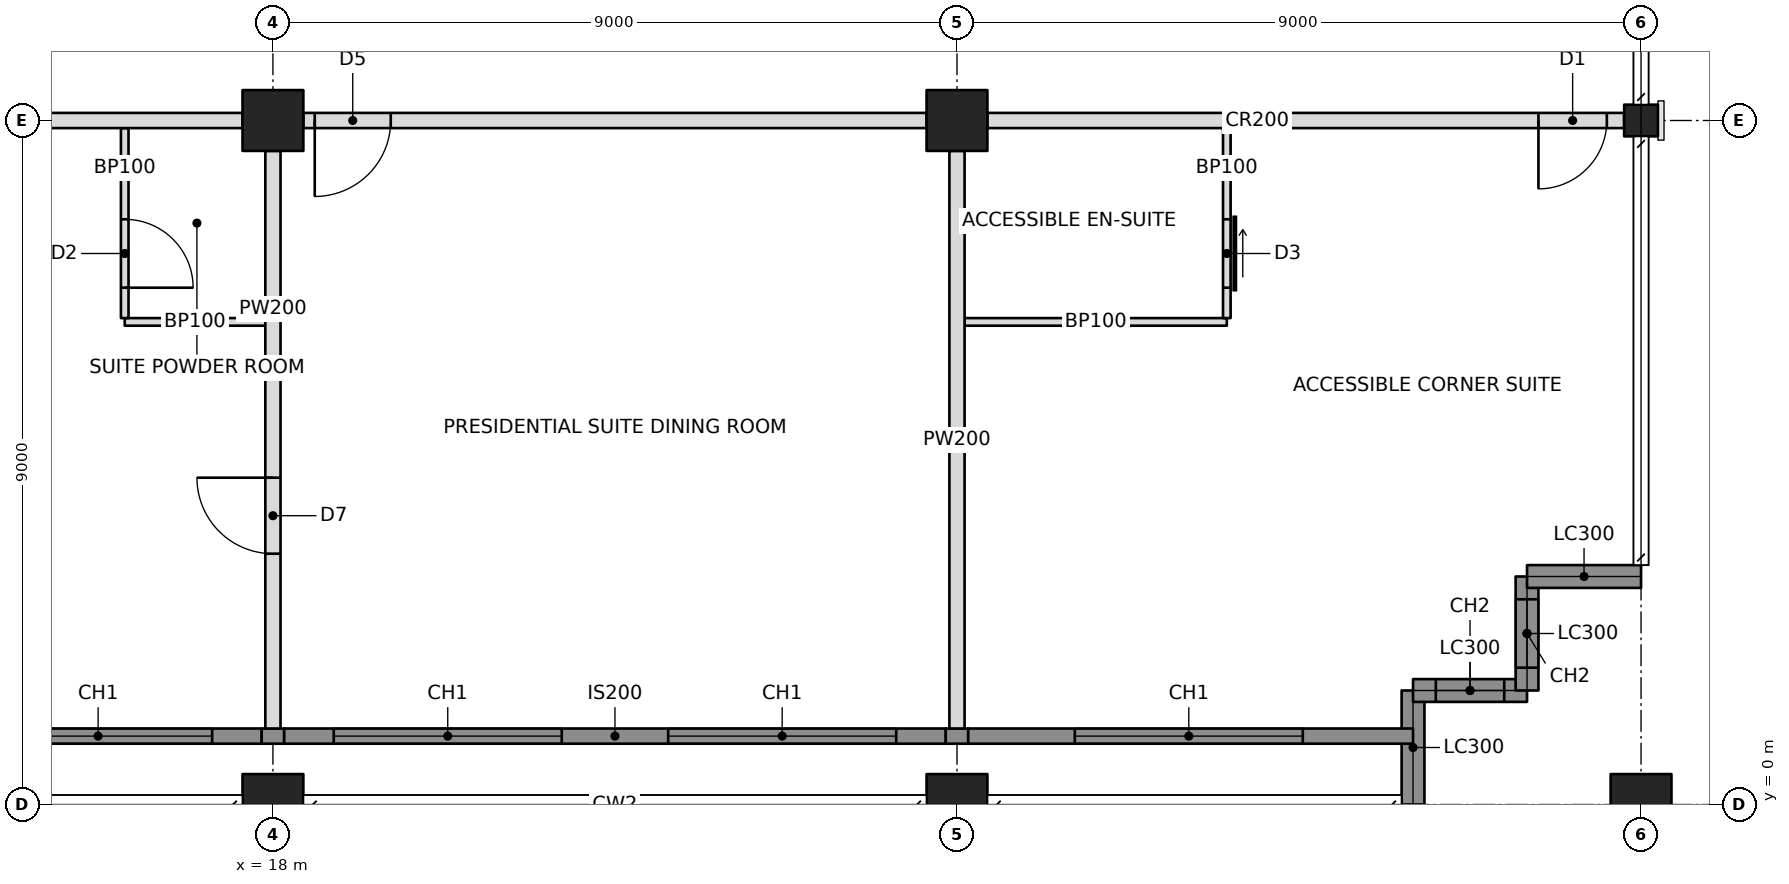
"""IFC4 building model, lengths in metres.
Left out: names, types, materials, properties, quantities, classifications, styles, units other than length and angle.
Written with IfcOpenShell. Run it as: python <this file> out.ifc"""

import sys

from ifc_helpers import new_model, si_unit, direction, frame, frame_2d, origin, origin_2d, place, context, subcontext, project, spatial, rectangle, hollow_rectangle, i_section, extrude, element, fill, save


model = new_model("IFC4")
c1 = context("Model", 3, precision=1e-05, world=origin(), true_north=direction((0.0, 1.0)))
c2 = subcontext(c1, "Body", "Model", "MODEL_VIEW")
j1 = project(units=[si_unit("LENGTHUNIT", "METRE"), si_unit("PLANEANGLEUNIT", "RADIAN")], contexts=[c1])
p1 = place(None, origin())
s1 = spatial("IfcSite", under=j1, at=p1, CompositionType="ELEMENT")
p2 = place(p1, origin())
s2 = spatial("IfcBuilding", under=s1, at=p2, CompositionType="ELEMENT")
p3 = place(p2, frame((0.0, 0.0, 266.2)))
s3 = spatial("IfcBuildingStorey", under=s2, at=p3, CompositionType="ELEMENT", Elevation=266.2)
for number, where, z_axis, x_axis in (
    (1, (18.0, 0.0, 0.0), (0.0, 0.0, 1.0), (1.0, 0.0, 0.0)),
    (2, (18.0, 9.0, 0.0), (0.0, 0.0, 1.0), (1.0, 0.0, 0.0)),
    (3, (27.0, 0.0, 0.0), (0.0, 0.0, 1.0), (1.0, 0.0, 0.0)),
    (4, (27.0, 9.0, 0.0), (0.0, 0.0, 1.0), (1.0, 0.0, 0.0)),
    (5, (36.0, 0.0, 0.0), (0.0, 0.0, 1.0), (1.0, 0.0, 0.0)),
):
    element("IfcColumn", number, at=place(p3, frame(where, z_axis=z_axis, x_axis=x_axis)), inside=s3, PredefinedType="COLUMN", context=c2, shape_type="SweptSolid", body=[
        extrude(hollow_rectangle(XDim=0.8, YDim=0.8, WallThickness=0.032, at=origin_2d()), origin(), (0.0, 0.0, 1.0), 3.6),
    ])
p4 = place(p3, frame((36.0, 9.0, 0.0), z_axis=(0.0, 0.0, 1.0), x_axis=(0.0, 1.0, 0.0)))
e6 = element("IfcColumn", 6, at=p4, inside=s3, PredefinedType="COLUMN", context=c2, shape_type="SweptSolid", body=[
    extrude(i_section(OverallWidth=0.417, OverallDepth=0.445, WebThickness=0.039, FlangeThickness=0.063, at=origin_2d()), origin(), (0.0, 0.0, 1.0), 3.6),
])
p5 = place(p3, frame((33.0, 0.0, 0.0), z_axis=(0.0, 0.0, 1.0), x_axis=(0.0, 1.0, 0.0)))
e7 = element("IfcWall", 7, at=p5, inside=s3, PredefinedType="SOLIDWALL", context=c2, shape_type="SweptSolid", body=[
    extrude(rectangle(XDim=1.5, YDim=0.3, at=frame_2d((0.75, 0.0))), origin(), (0.0, 0.0, 1.0), 2.57),
])
p6 = place(p3, frame((33.0, 1.5, 0.0), z_axis=(0.0, 0.0, 1.0), x_axis=(1.0, 0.0, 0.0)))
e8 = element("IfcWall", 8, at=p6, inside=s3, PredefinedType="SOLIDWALL", context=c2, shape_type="SweptSolid", body=[
    extrude(rectangle(XDim=1.5, YDim=0.3, at=frame_2d((0.75, 0.0))), origin(), (0.0, 0.0, 1.0), 3.35),
])
p7 = place(p6, frame((0.3, 0.0, 0.6)))
e9 = element("IfcOpeningElement", 9, at=p7, cuts=e8, PredefinedType="OPENING", context=c2, shape_type="SweptSolid", body=[
    extrude(rectangle(XDim=0.9, YDim=2.2, at=frame_2d((0.45, 1.1))), frame((0.0, 0.16, 0.0), z_axis=(0.0, -1.0, 0.0), x_axis=(1.0, 0.0, 0.0)), (0.0, 0.0, 1.0), 0.32),
])
p8 = place(p3, frame((34.5, 1.5, 0.0), z_axis=(0.0, 0.0, 1.0), x_axis=(0.0, 1.0, 0.0)))
e10 = element("IfcWall", 10, at=p8, inside=s3, PredefinedType="SOLIDWALL", context=c2, shape_type="SweptSolid", body=[
    extrude(rectangle(XDim=1.5, YDim=0.3, at=frame_2d((0.75, 0.0))), origin(), (0.0, 0.0, 1.0), 3.35),
])
p9 = place(p8, frame((0.3, 0.0, 0.6)))
e11 = element("IfcOpeningElement", 11, at=p9, cuts=e10, PredefinedType="OPENING", context=c2, shape_type="SweptSolid", body=[
    extrude(rectangle(XDim=0.9, YDim=2.2, at=frame_2d((0.45, 1.1))), frame((0.0, 0.16, 0.0), z_axis=(0.0, -1.0, 0.0), x_axis=(1.0, 0.0, 0.0)), (0.0, 0.0, 1.0), 0.32),
])
p10 = place(p3, frame((34.5, 3.0, 0.0), z_axis=(0.0, 0.0, 1.0), x_axis=(1.0, 0.0, 0.0)))
e12 = element("IfcWall", 12, at=p10, inside=s3, PredefinedType="SOLIDWALL", context=c2, shape_type="SweptSolid", body=[
    extrude(rectangle(XDim=1.5, YDim=0.3, at=frame_2d((0.75, 0.0))), origin(), (0.0, 0.0, 1.0), 2.57),
])
p11 = place(p3, frame((9.4, 9.0, 0.0), z_axis=(0.0, 0.0, 1.0), x_axis=(1.0, 0.0, 0.0)))
e13 = element("IfcWall", 13, at=p11, inside=s3, PredefinedType="PARTITIONING", context=c2, shape_type="SweptSolid", body=[
    extrude(rectangle(XDim=8.2, YDim=0.2, at=frame_2d((4.1, 0.0))), origin(), (0.0, 0.0, 1.0), 2.491),
])
p12 = place(p11, frame((0.15, 0.0, 0.0)))
e14 = element("IfcOpeningElement", 14, at=p12, cuts=e13, PredefinedType="OPENING", context=c2, shape_type="SweptSolid", body=[
    extrude(rectangle(XDim=0.9, YDim=2.1, at=frame_2d((0.45, 1.05))), frame((0.0, 0.11, 0.0), z_axis=(0.0, -1.0, 0.0), x_axis=(1.0, 0.0, 0.0)), (0.0, 0.0, 1.0), 0.22),
])
p13 = place(p3, frame((18.4, 9.0, 0.0), z_axis=(0.0, 0.0, 1.0), x_axis=(1.0, 0.0, 0.0)))
e15 = element("IfcWall", 15, at=p13, inside=s3, PredefinedType="PARTITIONING", context=c2, shape_type="SweptSolid", body=[
    extrude(rectangle(XDim=8.2, YDim=0.2, at=frame_2d((4.1, 0.0))), origin(), (0.0, 0.0, 1.0), 2.491),
])
p14 = place(p13, frame((0.15, 0.0, 0.0)))
e16 = element("IfcOpeningElement", 16, at=p14, cuts=e15, PredefinedType="OPENING", context=c2, shape_type="SweptSolid", body=[
    extrude(rectangle(XDim=1.0, YDim=2.1, at=frame_2d((0.5, 1.05))), frame((0.0, 0.11, 0.0), z_axis=(0.0, -1.0, 0.0), x_axis=(1.0, 0.0, 0.0)), (0.0, 0.0, 1.0), 0.22),
])
p15 = place(p3, frame((27.4, 9.0, 0.0), z_axis=(0.0, 0.0, 1.0), x_axis=(1.0, 0.0, 0.0)))
e17 = element("IfcWall", 17, at=p15, inside=s3, PredefinedType="PARTITIONING", context=c2, shape_type="SweptSolid", body=[
    extrude(rectangle(XDim=8.378, YDim=0.2, at=frame_2d((4.189, 0.0))), origin(), (0.0, 0.0, 1.0), 2.491),
])
p16 = place(p15, frame((7.25, 0.0, 0.0)))
e18 = element("IfcOpeningElement", 18, at=p16, cuts=e17, PredefinedType="OPENING", context=c2, shape_type="SweptSolid", body=[
    extrude(rectangle(XDim=0.9, YDim=2.1, at=frame_2d((0.45, 1.05))), frame((0.0, 0.11, 0.0), z_axis=(0.0, -1.0, 0.0), x_axis=(1.0, 0.0, 0.0)), (0.0, 0.0, 1.0), 0.22),
])
p17 = place(p3, frame((18.0, 8.6, 0.0), z_axis=(0.0, 0.0, 1.0), x_axis=(0.0, -1.0, 0.0)))
e19 = element("IfcWall", 19, at=p17, inside=s3, PredefinedType="PARTITIONING", context=c2, shape_type="SweptSolid", body=[
    extrude(rectangle(XDim=7.6, YDim=0.2, at=frame_2d((3.8, 0.0))), origin(), (0.0, 0.0, 1.0), 2.491),
])
p18 = place(p17, frame((4.3, 0.0, 0.0)))
e20 = element("IfcOpeningElement", 20, at=p18, cuts=e19, PredefinedType="OPENING", context=c2, shape_type="SweptSolid", body=[
    extrude(rectangle(XDim=1.0, YDim=2.1, at=frame_2d((0.5, 1.05))), frame((0.0, 0.11, 0.0), z_axis=(0.0, -1.0, 0.0), x_axis=(1.0, 0.0, 0.0)), (0.0, 0.0, 1.0), 0.22),
])
p19 = place(p3, frame((27.0, 8.6, 0.0), z_axis=(0.0, 0.0, 1.0), x_axis=(0.0, -1.0, 0.0)))
e21 = element("IfcWall", 21, at=p19, inside=s3, PredefinedType="PARTITIONING", context=c2, shape_type="SweptSolid", body=[
    extrude(rectangle(XDim=7.6, YDim=0.2, at=frame_2d((3.8, 0.0))), origin(), (0.0, 0.0, 1.0), 2.491),
])
p20 = place(p3, frame((16.05, 6.35, 0.0), z_axis=(0.0, 0.0, 1.0), x_axis=(1.0, 0.0, 0.0)))
e22 = element("IfcWall", 22, at=p20, inside=s3, PredefinedType="PARTITIONING", context=c2, shape_type="SweptSolid", body=[
    extrude(rectangle(XDim=1.85, YDim=0.1, at=frame_2d((0.925, 0.0))), origin(), (0.0, 0.0, 1.0), 2.491),
])
p21 = place(p3, frame((16.05, 8.9, 0.0), z_axis=(0.0, 0.0, 1.0), x_axis=(0.0, -1.0, 0.0)))
e23 = element("IfcWall", 23, at=p21, inside=s3, PredefinedType="PARTITIONING", context=c2, shape_type="SweptSolid", body=[
    extrude(rectangle(XDim=2.5, YDim=0.1, at=frame_2d((1.25, 0.0))), origin(), (0.0, 0.0, 1.0), 2.491),
])
p22 = place(p21, frame((1.2, 0.0, 0.0)))
e24 = element("IfcOpeningElement", 24, at=p22, cuts=e23, PredefinedType="OPENING", context=c2, shape_type="SweptSolid", body=[
    extrude(rectangle(XDim=0.9, YDim=2.1, at=frame_2d((0.45, 1.05))), frame((0.0, 0.06, 0.0), z_axis=(0.0, -1.0, 0.0), x_axis=(1.0, 0.0, 0.0)), (0.0, 0.0, 1.0), 0.12),
])
p23 = place(p3, frame((27.1, 6.35, 0.0), z_axis=(0.0, 0.0, 1.0), x_axis=(1.0, 0.0, 0.0)))
e25 = element("IfcWall", 25, at=p23, inside=s3, PredefinedType="PARTITIONING", context=c2, shape_type="SweptSolid", body=[
    extrude(rectangle(XDim=3.45, YDim=0.1, at=frame_2d((1.725, 0.0))), origin(), (0.0, 0.0, 1.0), 2.491),
])
p24 = place(p3, frame((30.55, 8.9, 0.0), z_axis=(0.0, 0.0, 1.0), x_axis=(0.0, -1.0, 0.0)))
e26 = element("IfcWall", 26, at=p24, inside=s3, PredefinedType="PARTITIONING", context=c2, shape_type="SweptSolid", body=[
    extrude(rectangle(XDim=2.5, YDim=0.1, at=frame_2d((1.25, 0.0))), origin(), (0.0, 0.0, 1.0), 2.491),
])
p25 = place(p24, frame((1.2, 0.0, 0.0)))
e27 = element("IfcOpeningElement", 27, at=p25, cuts=e26, PredefinedType="OPENING", context=c2, shape_type="SweptSolid", body=[
    extrude(rectangle(XDim=0.9, YDim=2.1, at=frame_2d((0.45, 1.05))), frame((0.0, 0.06, 0.0), z_axis=(0.0, -1.0, 0.0), x_axis=(1.0, 0.0, 0.0)), (0.0, 0.0, 1.0), 0.12),
])
p26 = place(p3, frame((9.148, 0.9, 0.0), z_axis=(0.0, 0.0, 1.0), x_axis=(1.0, 0.0, 0.0)))
e28 = element("IfcWall", 28, at=p26, inside=s3, PredefinedType="SOLIDWALL", context=c2, shape_type="SweptSolid", body=[
    extrude(rectangle(XDim=8.704, YDim=0.2, at=frame_2d((4.352, 0.0))), origin(), (0.0, 0.0, 1.0), 3.35),
])
p27 = place(p26, frame((0.652, 0.0, 0.6)))
e29 = element("IfcOpeningElement", 29, at=p27, cuts=e28, PredefinedType="OPENING", context=c2, shape_type="SweptSolid", body=[
    extrude(rectangle(XDim=3.0, YDim=2.2, at=frame_2d((1.5, 1.1))), frame((0.0, 0.11, 0.0), z_axis=(0.0, -1.0, 0.0), x_axis=(1.0, 0.0, 0.0)), (0.0, 0.0, 1.0), 0.22),
])
p28 = place(p26, frame((5.052, 0.0, 0.6)))
e30 = element("IfcOpeningElement", 30, at=p28, cuts=e28, PredefinedType="OPENING", context=c2, shape_type="SweptSolid", body=[
    extrude(rectangle(XDim=3.0, YDim=2.2, at=frame_2d((1.5, 1.1))), frame((0.0, 0.11, 0.0), z_axis=(0.0, -1.0, 0.0), x_axis=(1.0, 0.0, 0.0)), (0.0, 0.0, 1.0), 0.22),
])
p29 = place(p3, frame((17.852, 0.9, 0.0), z_axis=(0.0, 0.0, 1.0), x_axis=(1.0, 0.0, 0.0)))
e31 = element("IfcWall", 31, at=p29, inside=s3, PredefinedType="SOLIDWALL", context=c2, shape_type="SweptSolid", body=[
    extrude(rectangle(XDim=0.296, YDim=0.2, at=frame_2d((0.148, 0.0))), origin(), (0.0, 0.0, 1.0), 2.491),
])
p30 = place(p3, frame((18.148, 0.9, 0.0), z_axis=(0.0, 0.0, 1.0), x_axis=(1.0, 0.0, 0.0)))
e32 = element("IfcWall", 32, at=p30, inside=s3, PredefinedType="SOLIDWALL", context=c2, shape_type="SweptSolid", body=[
    extrude(rectangle(XDim=8.704, YDim=0.2, at=frame_2d((4.352, 0.0))), origin(), (0.0, 0.0, 1.0), 3.35),
])
p31 = place(p30, frame((0.652, 0.0, 0.6)))
e33 = element("IfcOpeningElement", 33, at=p31, cuts=e32, PredefinedType="OPENING", context=c2, shape_type="SweptSolid", body=[
    extrude(rectangle(XDim=3.0, YDim=2.2, at=frame_2d((1.5, 1.1))), frame((0.0, 0.11, 0.0), z_axis=(0.0, -1.0, 0.0), x_axis=(1.0, 0.0, 0.0)), (0.0, 0.0, 1.0), 0.22),
])
p32 = place(p30, frame((5.052, 0.0, 0.6)))
e34 = element("IfcOpeningElement", 34, at=p32, cuts=e32, PredefinedType="OPENING", context=c2, shape_type="SweptSolid", body=[
    extrude(rectangle(XDim=3.0, YDim=2.2, at=frame_2d((1.5, 1.1))), frame((0.0, 0.11, 0.0), z_axis=(0.0, -1.0, 0.0), x_axis=(1.0, 0.0, 0.0)), (0.0, 0.0, 1.0), 0.22),
])
p33 = place(p3, frame((26.852, 0.9, 0.0), z_axis=(0.0, 0.0, 1.0), x_axis=(1.0, 0.0, 0.0)))
e35 = element("IfcWall", 35, at=p33, inside=s3, PredefinedType="SOLIDWALL", context=c2, shape_type="SweptSolid", body=[
    extrude(rectangle(XDim=0.296, YDim=0.2, at=frame_2d((0.148, 0.0))), origin(), (0.0, 0.0, 1.0), 2.491),
])
p34 = place(p3, frame((27.148, 0.9, 0.0), z_axis=(0.0, 0.0, 1.0), x_axis=(1.0, 0.0, 0.0)))
e36 = element("IfcWall", 36, at=p34, inside=s3, PredefinedType="SOLIDWALL", context=c2, shape_type="SweptSolid", body=[
    extrude(rectangle(XDim=5.852, YDim=0.2, at=frame_2d((2.926, 0.0))), origin(), (0.0, 0.0, 1.0), 3.35),
])
p35 = place(p34, frame((1.402, 0.0, 0.6)))
e37 = element("IfcOpeningElement", 37, at=p35, cuts=e36, PredefinedType="OPENING", context=c2, shape_type="SweptSolid", body=[
    extrude(rectangle(XDim=3.0, YDim=2.2, at=frame_2d((1.5, 1.1))), frame((0.0, 0.11, 0.0), z_axis=(0.0, -1.0, 0.0), x_axis=(1.0, 0.0, 0.0)), (0.0, 0.0, 1.0), 0.22),
])
p36 = place(p7, origin())
e38 = element("IfcWindow", 38, at=p36, inside=s3, PartitioningType="SINGLE_PANEL", PredefinedType="WINDOW", context=c2, shape_type="SweptSolid", body=[
    extrude(rectangle(XDim=0.9, YDim=2.2, at=frame_2d((0.45, 1.1))), frame((0.0, 0.03, 0.0), z_axis=(0.0, -1.0, 0.0), x_axis=(1.0, 0.0, 0.0)), (0.0, 0.0, 1.0), 0.06),
])
fill(e9, e38)
p37 = place(p9, origin())
e39 = element("IfcWindow", 39, at=p37, inside=s3, PartitioningType="SINGLE_PANEL", PredefinedType="WINDOW", context=c2, shape_type="SweptSolid", body=[
    extrude(rectangle(XDim=0.9, YDim=2.2, at=frame_2d((0.45, 1.1))), frame((0.0, 0.03, 0.0), z_axis=(0.0, -1.0, 0.0), x_axis=(1.0, 0.0, 0.0)), (0.0, 0.0, 1.0), 0.06),
])
fill(e11, e39)
p38 = place(p28, origin())
e40 = element("IfcWindow", 40, at=p38, inside=s3, PartitioningType="TRIPLE_PANEL_VERTICAL", PredefinedType="WINDOW", context=c2, shape_type="SweptSolid", body=[
    extrude(rectangle(XDim=3.0, YDim=2.2, at=frame_2d((1.5, 1.1))), frame((0.0, 0.03, 0.0), z_axis=(0.0, -1.0, 0.0), x_axis=(1.0, 0.0, 0.0)), (0.0, 0.0, 1.0), 0.06),
])
fill(e30, e40)
p39 = place(p31, origin())
e41 = element("IfcWindow", 41, at=p39, inside=s3, PartitioningType="TRIPLE_PANEL_VERTICAL", PredefinedType="WINDOW", context=c2, shape_type="SweptSolid", body=[
    extrude(rectangle(XDim=3.0, YDim=2.2, at=frame_2d((1.5, 1.1))), frame((0.0, 0.03, 0.0), z_axis=(0.0, -1.0, 0.0), x_axis=(1.0, 0.0, 0.0)), (0.0, 0.0, 1.0), 0.06),
])
fill(e33, e41)
p40 = place(p32, origin())
e42 = element("IfcWindow", 42, at=p40, inside=s3, PartitioningType="TRIPLE_PANEL_VERTICAL", PredefinedType="WINDOW", context=c2, shape_type="SweptSolid", body=[
    extrude(rectangle(XDim=3.0, YDim=2.2, at=frame_2d((1.5, 1.1))), frame((0.0, 0.03, 0.0), z_axis=(0.0, -1.0, 0.0), x_axis=(1.0, 0.0, 0.0)), (0.0, 0.0, 1.0), 0.06),
])
fill(e34, e42)
p41 = place(p35, origin())
e43 = element("IfcWindow", 43, at=p41, inside=s3, PartitioningType="TRIPLE_PANEL_VERTICAL", PredefinedType="WINDOW", context=c2, shape_type="SweptSolid", body=[
    extrude(rectangle(XDim=3.0, YDim=2.2, at=frame_2d((1.5, 1.1))), frame((0.0, 0.03, 0.0), z_axis=(0.0, -1.0, 0.0), x_axis=(1.0, 0.0, 0.0)), (0.0, 0.0, 1.0), 0.06),
])
fill(e37, e43)
p42 = place(p18, frame((1.0, 0.0, 0.0), z_axis=(0.0, 0.0, 1.0), x_axis=(-1.0, 0.0, 0.0)))
e44 = element("IfcDoor", 44, at=p42, inside=s3, OperationType="SINGLE_SWING_RIGHT", PredefinedType="DOOR", context=c2, shape_type="SweptSolid", body=[
    extrude(rectangle(XDim=1.0, YDim=2.1, at=frame_2d((0.5, 1.05))), frame((0.0, 0.025, 0.0), z_axis=(0.0, -1.0, 0.0), x_axis=(1.0, 0.0, 0.0)), (0.0, 0.0, 1.0), 0.05),
])
fill(e20, e44)
p43 = place(p22, origin())
e45 = element("IfcDoor", 45, at=p43, inside=s3, OperationType="SINGLE_SWING_RIGHT", PredefinedType="DOOR", context=c2, shape_type="SweptSolid", body=[
    extrude(rectangle(XDim=0.9, YDim=2.1, at=frame_2d((0.45, 1.05))), frame((0.0, 0.025, 0.0), z_axis=(0.0, -1.0, 0.0), x_axis=(1.0, 0.0, 0.0)), (0.0, 0.0, 1.0), 0.05),
])
fill(e24, e45)
p44 = place(p14, frame((1.0, 0.0, 0.0), z_axis=(0.0, 0.0, 1.0), x_axis=(-1.0, 0.0, 0.0)))
e46 = element("IfcDoor", 46, at=p44, inside=s3, OperationType="SINGLE_SWING_RIGHT", PredefinedType="DOOR", context=c2, shape_type="SweptSolid", body=[
    extrude(rectangle(XDim=1.0, YDim=2.1, at=frame_2d((0.5, 1.05))), frame((0.0, 0.025, 0.0), z_axis=(0.0, -1.0, 0.0), x_axis=(1.0, 0.0, 0.0)), (0.0, 0.0, 1.0), 0.05),
])
fill(e16, e46)
p45 = place(p25, origin())
e47 = element("IfcDoor", 47, at=p45, inside=s3, OperationType="SLIDING_TO_LEFT", PredefinedType="DOOR", context=c2, shape_type="SweptSolid", body=[
    extrude(rectangle(XDim=0.9, YDim=2.1, at=frame_2d((0.45, 1.05))), frame((0.0, 0.025, 0.0), z_axis=(0.0, -1.0, 0.0), x_axis=(1.0, 0.0, 0.0)), (0.0, 0.0, 1.0), 0.05),
])
fill(e27, e47)
p46 = place(p16, frame((0.9, 0.0, 0.0), z_axis=(0.0, 0.0, 1.0), x_axis=(-1.0, 0.0, 0.0)))
e48 = element("IfcDoor", 48, at=p46, inside=s3, OperationType="SINGLE_SWING_RIGHT", PredefinedType="DOOR", context=c2, shape_type="SweptSolid", body=[
    extrude(rectangle(XDim=0.9, YDim=2.1, at=frame_2d((0.45, 1.05))), frame((0.0, 0.025, 0.0), z_axis=(0.0, -1.0, 0.0), x_axis=(1.0, 0.0, 0.0)), (0.0, 0.0, 1.0), 0.05),
])
fill(e18, e48)
save(model, sys.argv[1])
